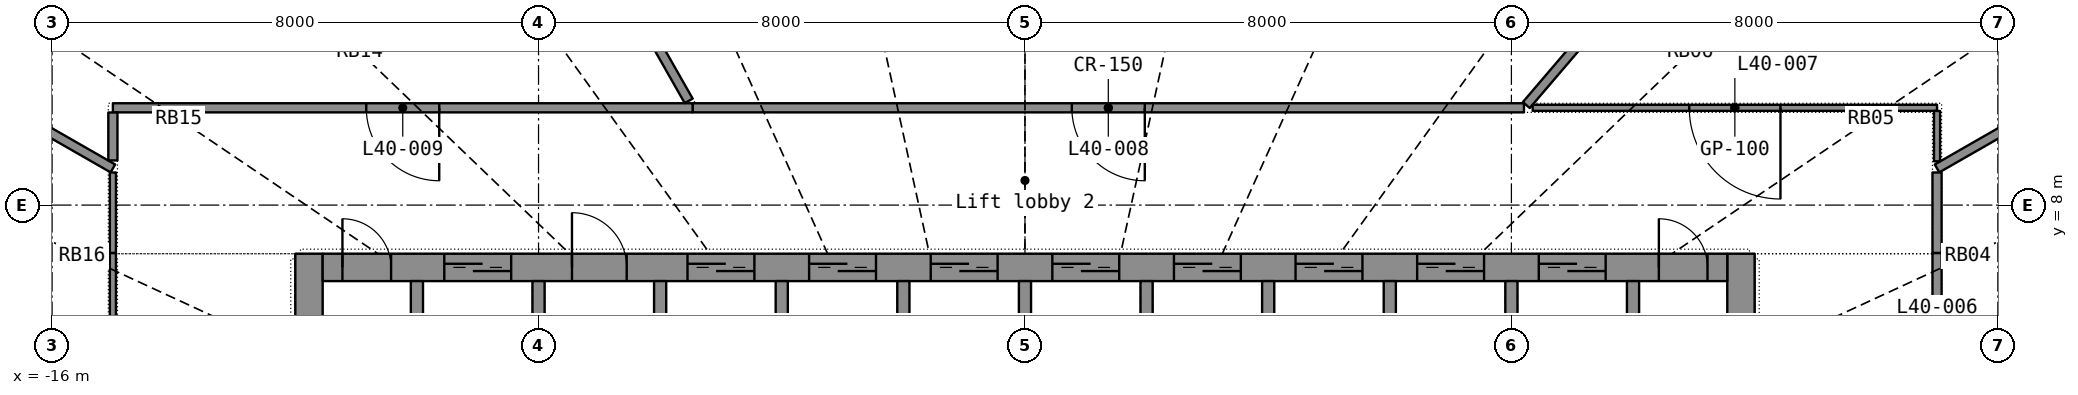
"""IFC4 building model, lengths in metres.
Left out: names, types, materials, properties, quantities, classifications, styles, units other than length and angle.
Written with IfcOpenShell. Run it as: python <this file> out.ifc"""

import sys

from ifc_helpers import new_model, si_unit, direction, frame, frame_2d, origin, place, context, subcontext, project, spatial, rectangle, extrude, element, fill, save


model = new_model("IFC4")
c1 = context("Model", 3, precision=1e-05, world=origin(), true_north=direction((0.0, 1.0)))
c2 = subcontext(c1, "Body", "Model", "MODEL_VIEW")
j1 = project(units=[si_unit("LENGTHUNIT", "METRE"), si_unit("PLANEANGLEUNIT", "RADIAN")], contexts=[c1])
p1 = place(None, origin())
s1 = spatial("IfcSite", under=j1, at=p1, CompositionType="ELEMENT")
p2 = place(p1, origin())
s2 = spatial("IfcBuilding", under=s1, at=p2, CompositionType="ELEMENT")
p3 = place(p2, frame((0.0, 0.0, 168.2)))
s3 = spatial("IfcBuildingStorey", under=s2, at=p3, CompositionType="ELEMENT", Elevation=168.2)
p4 = place(p3, frame((-11.775, -7.2, 0.0), z_axis=(0.0, 0.0, 1.0), x_axis=(0.0, 1.0, 0.0)))
e1 = element("IfcWall", 1, at=p4, inside=s3, PredefinedType="SHEAR", context=c2, shape_type="SweptSolid", body=[
    extrude(rectangle(XDim=14.4, YDim=0.45, at=frame_2d((7.2, 0.0))), origin(), (0.0, 0.0, 1.0), 3.3),
])
p5 = place(p4, frame((6.5, 0.0, 0.0)))
e2 = element("IfcOpeningElement", 2, at=p5, cuts=e1, PredefinedType="OPENING", context=c2, shape_type="SweptSolid", body=[
    extrude(rectangle(XDim=1.4, YDim=2.2, at=frame_2d((0.7, 1.1))), frame((0.0, 0.235, 0.0), z_axis=(0.0, -1.0, 0.0), x_axis=(1.0, 0.0, 0.0)), (0.0, 0.0, 1.0), 0.47),
])
p6 = place(p3, frame((11.775, -7.2, 0.0), z_axis=(0.0, 0.0, 1.0), x_axis=(0.0, 1.0, 0.0)))
e3 = element("IfcWall", 3, at=p6, inside=s3, PredefinedType="SHEAR", context=c2, shape_type="SweptSolid", body=[
    extrude(rectangle(XDim=14.4, YDim=0.45, at=frame_2d((7.2, 0.0))), origin(), (0.0, 0.0, 1.0), 3.3),
])
p7 = place(p6, frame((6.5, 0.0, 0.0)))
e4 = element("IfcOpeningElement", 4, at=p7, cuts=e3, PredefinedType="OPENING", context=c2, shape_type="SweptSolid", body=[
    extrude(rectangle(XDim=1.4, YDim=2.2, at=frame_2d((0.7, 1.1))), frame((0.0, 0.235, 0.0), z_axis=(0.0, -1.0, 0.0), x_axis=(1.0, 0.0, 0.0)), (0.0, 0.0, 1.0), 0.47),
])
p8 = place(p3, frame((-11.55, 6.975, 0.0), z_axis=(0.0, 0.0, 1.0), x_axis=(1.0, 0.0, 0.0)))
e5 = element("IfcWall", 5, at=p8, inside=s3, PredefinedType="SHEAR", context=c2, shape_type="SweptSolid", body=[
    extrude(rectangle(XDim=23.1, YDim=0.45, at=frame_2d((11.55, 0.0))), origin(), (0.0, 0.0, 1.0), 3.3),
])
p9 = place(p8, frame((2.0, 0.0, 0.0)))
e6 = element("IfcOpeningElement", 6, at=p9, cuts=e5, PredefinedType="OPENING", context=c2, shape_type="SweptSolid", body=[
    extrude(rectangle(XDim=1.1, YDim=2.2, at=frame_2d((0.55, 1.1))), frame((0.0, 0.235, 0.0), z_axis=(0.0, -1.0, 0.0), x_axis=(1.0, 0.0, 0.0)), (0.0, 0.0, 1.0), 0.47),
])
p10 = place(p8, frame((6.0, 0.0, 0.0)))
e7 = element("IfcOpeningElement", 7, at=p10, cuts=e5, PredefinedType="OPENING", context=c2, shape_type="SweptSolid", body=[
    extrude(rectangle(XDim=1.1, YDim=2.2, at=frame_2d((0.55, 1.1))), frame((0.0, 0.235, 0.0), z_axis=(0.0, -1.0, 0.0), x_axis=(1.0, 0.0, 0.0)), (0.0, 0.0, 1.0), 0.47),
])
p11 = place(p8, frame((8.0, 0.0, 0.0)))
e8 = element("IfcOpeningElement", 8, at=p11, cuts=e5, PredefinedType="OPENING", context=c2, shape_type="SweptSolid", body=[
    extrude(rectangle(XDim=1.1, YDim=2.2, at=frame_2d((0.55, 1.1))), frame((0.0, 0.235, 0.0), z_axis=(0.0, -1.0, 0.0), x_axis=(1.0, 0.0, 0.0)), (0.0, 0.0, 1.0), 0.47),
])
p12 = place(p8, frame((10.0, 0.0, 0.0)))
e9 = element("IfcOpeningElement", 9, at=p12, cuts=e5, PredefinedType="OPENING", context=c2, shape_type="SweptSolid", body=[
    extrude(rectangle(XDim=1.1, YDim=2.2, at=frame_2d((0.55, 1.1))), frame((0.0, 0.235, 0.0), z_axis=(0.0, -1.0, 0.0), x_axis=(1.0, 0.0, 0.0)), (0.0, 0.0, 1.0), 0.47),
])
p13 = place(p8, frame((12.0, 0.0, 0.0)))
e10 = element("IfcOpeningElement", 10, at=p13, cuts=e5, PredefinedType="OPENING", context=c2, shape_type="SweptSolid", body=[
    extrude(rectangle(XDim=1.1, YDim=2.2, at=frame_2d((0.55, 1.1))), frame((0.0, 0.235, 0.0), z_axis=(0.0, -1.0, 0.0), x_axis=(1.0, 0.0, 0.0)), (0.0, 0.0, 1.0), 0.47),
])
p14 = place(p8, frame((14.0, 0.0, 0.0)))
e11 = element("IfcOpeningElement", 11, at=p14, cuts=e5, PredefinedType="OPENING", context=c2, shape_type="SweptSolid", body=[
    extrude(rectangle(XDim=1.1, YDim=2.2, at=frame_2d((0.55, 1.1))), frame((0.0, 0.235, 0.0), z_axis=(0.0, -1.0, 0.0), x_axis=(1.0, 0.0, 0.0)), (0.0, 0.0, 1.0), 0.47),
])
p15 = place(p8, frame((16.0, 0.0, 0.0)))
e12 = element("IfcOpeningElement", 12, at=p15, cuts=e5, PredefinedType="OPENING", context=c2, shape_type="SweptSolid", body=[
    extrude(rectangle(XDim=1.1, YDim=2.2, at=frame_2d((0.55, 1.1))), frame((0.0, 0.235, 0.0), z_axis=(0.0, -1.0, 0.0), x_axis=(1.0, 0.0, 0.0)), (0.0, 0.0, 1.0), 0.47),
])
p16 = place(p8, frame((18.0, 0.0, 0.0)))
e13 = element("IfcOpeningElement", 13, at=p16, cuts=e5, PredefinedType="OPENING", context=c2, shape_type="SweptSolid", body=[
    extrude(rectangle(XDim=1.1, YDim=2.2, at=frame_2d((0.55, 1.1))), frame((0.0, 0.235, 0.0), z_axis=(0.0, -1.0, 0.0), x_axis=(1.0, 0.0, 0.0)), (0.0, 0.0, 1.0), 0.47),
])
p17 = place(p8, frame((20.0, 0.0, 0.0)))
e14 = element("IfcOpeningElement", 14, at=p17, cuts=e5, PredefinedType="OPENING", context=c2, shape_type="SweptSolid", body=[
    extrude(rectangle(XDim=1.1, YDim=2.2, at=frame_2d((0.55, 1.1))), frame((0.0, 0.235, 0.0), z_axis=(0.0, -1.0, 0.0), x_axis=(1.0, 0.0, 0.0)), (0.0, 0.0, 1.0), 0.47),
])
p18 = place(p8, frame((4.1, 0.0, 0.0)))
e15 = element("IfcOpeningElement", 15, at=p18, cuts=e5, PredefinedType="OPENING", context=c2, shape_type="SweptSolid", body=[
    extrude(rectangle(XDim=0.9, YDim=2.1, at=frame_2d((0.45, 1.05))), frame((0.0, 0.235, 0.0), z_axis=(0.0, -1.0, 0.0), x_axis=(1.0, 0.0, 0.0)), (0.0, 0.0, 1.0), 0.47),
])
p19 = place(p8, frame((0.325, 0.0, 0.0)))
e16 = element("IfcOpeningElement", 16, at=p19, cuts=e5, PredefinedType="OPENING", context=c2, shape_type="SweptSolid", body=[
    extrude(rectangle(XDim=0.8, YDim=2.05, at=frame_2d((0.4, 1.025))), frame((0.0, 0.235, 0.0), z_axis=(0.0, -1.0, 0.0), x_axis=(1.0, 0.0, 0.0)), (0.0, 0.0, 1.0), 0.47),
])
p20 = place(p8, frame((21.975, 0.0, 0.0)))
e17 = element("IfcOpeningElement", 17, at=p20, cuts=e5, PredefinedType="OPENING", context=c2, shape_type="SweptSolid", body=[
    extrude(rectangle(XDim=0.8, YDim=2.05, at=frame_2d((0.4, 1.025))), frame((0.0, 0.235, 0.0), z_axis=(0.0, -1.0, 0.0), x_axis=(1.0, 0.0, 0.0)), (0.0, 0.0, 1.0), 0.47),
])
for number, where, z_axis, x_axis in (
    (18, (-10.0, 3.9, 0.0), (0.0, 0.0, 1.0), (0.0, 1.0, 0.0)),
    (19, (-8.0, 3.9, 0.0), (0.0, 0.0, 1.0), (0.0, 1.0, 0.0)),
    (20, (-6.0, 3.9, 0.0), (0.0, 0.0, 1.0), (0.0, 1.0, 0.0)),
    (21, (-4.0, 3.9, 0.0), (0.0, 0.0, 1.0), (0.0, 1.0, 0.0)),
    (22, (-2.0, 3.9, 0.0), (0.0, 0.0, 1.0), (0.0, 1.0, 0.0)),
    (23, (0.0, 3.9, 0.0), (0.0, 0.0, 1.0), (0.0, 1.0, 0.0)),
    (24, (2.0, 3.9, 0.0), (0.0, 0.0, 1.0), (0.0, 1.0, 0.0)),
    (25, (4.0, 3.9, 0.0), (0.0, 0.0, 1.0), (0.0, 1.0, 0.0)),
    (26, (6.0, 3.9, 0.0), (0.0, 0.0, 1.0), (0.0, 1.0, 0.0)),
    (27, (8.0, 3.9, 0.0), (0.0, 0.0, 1.0), (0.0, 1.0, 0.0)),
    (28, (10.0, 3.9, 0.0), (0.0, 0.0, 1.0), (0.0, 1.0, 0.0)),
):
    element("IfcWall", number, at=place(p3, frame(where, z_axis=z_axis, x_axis=x_axis)), inside=s3, PredefinedType="SHEAR", context=c2, shape_type="SweptSolid", body=[
        extrude(rectangle(XDim=2.85, YDim=0.2, at=frame_2d((1.425, 0.0))), origin(), (0.0, 0.0, 1.0), 3.3),
    ])
p21 = place(p3, frame((8.206, 9.6, 0.0), z_axis=(0.0, 0.0, 1.0), x_axis=(-1.0, 0.0, 0.0)))
e29 = element("IfcWall", 29, at=p21, inside=s3, PredefinedType="PARTITIONING", context=c2, shape_type="SweptSolid", body=[
    extrude(rectangle(XDim=13.671, YDim=0.15, at=frame_2d((6.836, 0.0))), origin(), (0.0, 0.0, 1.0), 2.4),
])
p22 = place(p21, frame((6.236, 0.0, 0.0)))
e30 = element("IfcOpeningElement", 30, at=p22, cuts=e29, PredefinedType="OPENING", context=c2, shape_type="SweptSolid", body=[
    extrude(rectangle(XDim=1.2, YDim=2.2, at=frame_2d((0.6, 1.1))), frame((0.0, 0.085, 0.0), z_axis=(0.0, -1.0, 0.0), x_axis=(1.0, 0.0, 0.0)), (0.0, 0.0, 1.0), 0.17),
])
p23 = place(p3, frame((-5.466, 9.6, 0.0), z_axis=(0.0, 0.0, 1.0), x_axis=(-1.0, 0.0, 0.0)))
e31 = element("IfcWall", 31, at=p23, inside=s3, PredefinedType="PARTITIONING", context=c2, shape_type="SweptSolid", body=[
    extrude(rectangle(XDim=9.534, YDim=0.15, at=frame_2d((4.767, 0.0))), origin(), (0.0, 0.0, 1.0), 2.4),
])
p24 = place(p23, frame((4.167, 0.0, 0.0)))
e32 = element("IfcOpeningElement", 32, at=p24, cuts=e31, PredefinedType="OPENING", context=c2, shape_type="SweptSolid", body=[
    extrude(rectangle(XDim=1.2, YDim=2.2, at=frame_2d((0.6, 1.1))), frame((0.0, 0.085, 0.0), z_axis=(0.0, -1.0, 0.0), x_axis=(1.0, 0.0, 0.0)), (0.0, 0.0, 1.0), 0.17),
])
p25 = place(p3, frame((-9.884, 17.362, 0.0), z_axis=(0.0, 0.0, 1.0), x_axis=(0.494734165, -0.869044364, 0.0)))
e33 = element("IfcWall", 33, at=p25, inside=s3, PredefinedType="PARTITIONING", context=c2, shape_type="SweptSolid", body=[
    extrude(rectangle(XDim=8.801, YDim=0.15, at=frame_2d((4.4, 0.0))), origin(), (0.0, 0.0, 1.0), 2.4),
])
p26 = place(p3, frame((13.416, 15.694, 0.0), z_axis=(0.0, 0.0, 1.0), x_axis=(-0.649787725, -0.760115723, 0.0)))
e34 = element("IfcWall", 34, at=p26, inside=s3, PredefinedType="PARTITIONING", context=c2, shape_type="SweptSolid", body=[
    extrude(rectangle(XDim=7.958, YDim=0.15, at=frame_2d((3.979, 0.0))), origin(), (0.0, 0.0, 1.0), 2.4),
])
p27 = place(p3, frame((15.0, 9.6, 0.0), z_axis=(0.0, 0.0, 1.0), x_axis=(-1.0, 0.0, 0.0)))
e35 = element("IfcWall", 35, at=p27, inside=s3, PredefinedType="PARTITIONING", context=c2, shape_type="SweptSolid", body=[
    extrude(rectangle(XDim=6.65, YDim=0.1, at=frame_2d((3.325, 0.0))), origin(), (0.0, 0.0, 1.0), 2.4),
])
p28 = place(p27, frame((2.575, 0.0, 0.0)))
e36 = element("IfcOpeningElement", 36, at=p28, cuts=e35, PredefinedType="OPENING", context=c2, shape_type="SweptSolid", body=[
    extrude(rectangle(XDim=1.5, YDim=2.4, at=frame_2d((0.75, 1.2))), frame((0.0, 0.06, 0.0), z_axis=(0.0, -1.0, 0.0), x_axis=(1.0, 0.0, 0.0)), (0.0, 0.0, 1.0), 0.12),
])
p29 = place(p3, frame((-19.169, 10.994, 0.0), z_axis=(0.0, 0.0, 1.0), x_axis=(0.867457349, -0.497511556, 0.0)))
e37 = element("IfcWall", 37, at=p29, inside=s3, PredefinedType="PARTITIONING", context=c2, shape_type="SweptSolid", body=[
    extrude(rectangle(XDim=4.806, YDim=0.15, at=frame_2d((2.403, 0.0))), origin(), (0.0, 0.0, 1.0), 2.4),
])
p30 = place(p3, frame((19.167, 10.993, 0.0), z_axis=(0.0, 0.0, 1.0), x_axis=(-0.867466381, -0.497495807, 0.0)))
e38 = element("IfcWall", 38, at=p30, inside=s3, PredefinedType="PARTITIONING", context=c2, shape_type="SweptSolid", body=[
    extrude(rectangle(XDim=4.803, YDim=0.15, at=frame_2d((2.402, 0.0))), origin(), (0.0, 0.0, 1.0), 2.4),
])
p31 = place(p3, frame((-15.0, 7.212, 0.0), z_axis=(0.0, 0.0, 1.0), x_axis=(0.0, -1.0, 0.0)))
e39 = element("IfcWall", 39, at=p31, inside=s3, PredefinedType="PARTITIONING", context=c2, shape_type="SweptSolid", body=[
    extrude(rectangle(XDim=3.83, YDim=0.1, at=frame_2d((1.915, 0.0))), origin(), (0.0, 0.0, 1.0), 2.4),
])
p32 = place(p31, frame((1.165, 0.0, 0.0)))
e40 = element("IfcOpeningElement", 40, at=p32, cuts=e39, PredefinedType="OPENING", context=c2, shape_type="SweptSolid", body=[
    extrude(rectangle(XDim=1.5, YDim=2.4, at=frame_2d((0.75, 1.2))), frame((0.0, 0.06, 0.0), z_axis=(0.0, -1.0, 0.0), x_axis=(1.0, 0.0, 0.0)), (0.0, 0.0, 1.0), 0.12),
])
p33 = place(p3, frame((15.0, 3.387, 0.0), z_axis=(0.0, 0.0, 1.0), x_axis=(0.0, 1.0, 0.0)))
e41 = element("IfcWall", 41, at=p33, inside=s3, PredefinedType="PARTITIONING", context=c2, shape_type="SweptSolid", body=[
    extrude(rectangle(XDim=3.824, YDim=0.15, at=frame_2d((1.912, 0.0))), origin(), (0.0, 0.0, 1.0), 2.4),
])
p34 = place(p33, frame((1.437, 0.0, 0.0)))
e42 = element("IfcOpeningElement", 42, at=p34, cuts=e41, PredefinedType="OPENING", context=c2, shape_type="SweptSolid", body=[
    extrude(rectangle(XDim=0.95, YDim=2.15, at=frame_2d((0.475, 1.075))), frame((0.0, 0.085, 0.0), z_axis=(0.0, -1.0, 0.0), x_axis=(1.0, 0.0, 0.0)), (0.0, 0.0, 1.0), 0.17),
])
p35 = place(p3, frame((-15.0, 8.536, 0.0), z_axis=(0.0, 0.0, 1.0), x_axis=(0.0, -1.0, 0.0)))
e43 = element("IfcWall", 43, at=p35, inside=s3, PredefinedType="PARTITIONING", context=c2, shape_type="SweptSolid", body=[
    extrude(rectangle(XDim=1.323, YDim=0.1, at=frame_2d((0.662, 0.0))), origin(), (0.0, 0.0, 1.0), 2.4),
])
p36 = place(p3, frame((15.0, 7.213, 0.0), z_axis=(0.0, 0.0, 1.0), x_axis=(0.0, 1.0, 0.0)))
e44 = element("IfcWall", 44, at=p36, inside=s3, PredefinedType="PARTITIONING", context=c2, shape_type="SweptSolid", body=[
    extrude(rectangle(XDim=1.323, YDim=0.15, at=frame_2d((0.662, 0.0))), origin(), (0.0, 0.0, 1.0), 2.4),
])
p37 = place(p3, frame((-15.0, 9.523, 0.0), z_axis=(0.0, 0.0, 1.0), x_axis=(0.0, -1.0, 0.0)))
e45 = element("IfcWall", 45, at=p37, inside=s3, PredefinedType="PARTITIONING", context=c2, shape_type="SweptSolid", body=[
    extrude(rectangle(XDim=0.788, YDim=0.15, at=frame_2d((0.394, 0.0))), origin(), (0.0, 0.0, 1.0), 2.4),
])
p38 = place(p3, frame((15.0, 8.72, 0.0), z_axis=(0.0, 0.0, 1.0), x_axis=(0.0, 1.0, 0.0)))
e46 = element("IfcWall", 46, at=p38, inside=s3, PredefinedType="PARTITIONING", context=c2, shape_type="SweptSolid", body=[
    extrude(rectangle(XDim=0.828, YDim=0.1, at=frame_2d((0.414, 0.0))), origin(), (0.0, 0.0, 1.0), 2.4),
])
p39 = place(p9, origin())
e47 = element("IfcDoor", 47, at=p39, inside=s3, OperationType="DOUBLE_DOOR_SLIDING", PredefinedType="DOOR", context=c2, shape_type="SweptSolid", body=[
    extrude(rectangle(XDim=1.1, YDim=2.2, at=frame_2d((0.55, 1.1))), frame((0.0, 0.025, 0.0), z_axis=(0.0, -1.0, 0.0), x_axis=(1.0, 0.0, 0.0)), (0.0, 0.0, 1.0), 0.05),
])
fill(e6, e47)
p40 = place(p10, origin())
e48 = element("IfcDoor", 48, at=p40, inside=s3, OperationType="DOUBLE_DOOR_SLIDING", PredefinedType="DOOR", context=c2, shape_type="SweptSolid", body=[
    extrude(rectangle(XDim=1.1, YDim=2.2, at=frame_2d((0.55, 1.1))), frame((0.0, 0.025, 0.0), z_axis=(0.0, -1.0, 0.0), x_axis=(1.0, 0.0, 0.0)), (0.0, 0.0, 1.0), 0.05),
])
fill(e7, e48)
p41 = place(p11, origin())
e49 = element("IfcDoor", 49, at=p41, inside=s3, OperationType="DOUBLE_DOOR_SLIDING", PredefinedType="DOOR", context=c2, shape_type="SweptSolid", body=[
    extrude(rectangle(XDim=1.1, YDim=2.2, at=frame_2d((0.55, 1.1))), frame((0.0, 0.025, 0.0), z_axis=(0.0, -1.0, 0.0), x_axis=(1.0, 0.0, 0.0)), (0.0, 0.0, 1.0), 0.05),
])
fill(e8, e49)
p42 = place(p12, origin())
e50 = element("IfcDoor", 50, at=p42, inside=s3, OperationType="DOUBLE_DOOR_SLIDING", PredefinedType="DOOR", context=c2, shape_type="SweptSolid", body=[
    extrude(rectangle(XDim=1.1, YDim=2.2, at=frame_2d((0.55, 1.1))), frame((0.0, 0.025, 0.0), z_axis=(0.0, -1.0, 0.0), x_axis=(1.0, 0.0, 0.0)), (0.0, 0.0, 1.0), 0.05),
])
fill(e9, e50)
p43 = place(p13, origin())
e51 = element("IfcDoor", 51, at=p43, inside=s3, OperationType="DOUBLE_DOOR_SLIDING", PredefinedType="DOOR", context=c2, shape_type="SweptSolid", body=[
    extrude(rectangle(XDim=1.1, YDim=2.2, at=frame_2d((0.55, 1.1))), frame((0.0, 0.025, 0.0), z_axis=(0.0, -1.0, 0.0), x_axis=(1.0, 0.0, 0.0)), (0.0, 0.0, 1.0), 0.05),
])
fill(e10, e51)
p44 = place(p14, origin())
e52 = element("IfcDoor", 52, at=p44, inside=s3, OperationType="DOUBLE_DOOR_SLIDING", PredefinedType="DOOR", context=c2, shape_type="SweptSolid", body=[
    extrude(rectangle(XDim=1.1, YDim=2.2, at=frame_2d((0.55, 1.1))), frame((0.0, 0.025, 0.0), z_axis=(0.0, -1.0, 0.0), x_axis=(1.0, 0.0, 0.0)), (0.0, 0.0, 1.0), 0.05),
])
fill(e11, e52)
p45 = place(p15, origin())
e53 = element("IfcDoor", 53, at=p45, inside=s3, OperationType="DOUBLE_DOOR_SLIDING", PredefinedType="DOOR", context=c2, shape_type="SweptSolid", body=[
    extrude(rectangle(XDim=1.1, YDim=2.2, at=frame_2d((0.55, 1.1))), frame((0.0, 0.025, 0.0), z_axis=(0.0, -1.0, 0.0), x_axis=(1.0, 0.0, 0.0)), (0.0, 0.0, 1.0), 0.05),
])
fill(e12, e53)
p46 = place(p16, origin())
e54 = element("IfcDoor", 54, at=p46, inside=s3, OperationType="DOUBLE_DOOR_SLIDING", PredefinedType="DOOR", context=c2, shape_type="SweptSolid", body=[
    extrude(rectangle(XDim=1.1, YDim=2.2, at=frame_2d((0.55, 1.1))), frame((0.0, 0.025, 0.0), z_axis=(0.0, -1.0, 0.0), x_axis=(1.0, 0.0, 0.0)), (0.0, 0.0, 1.0), 0.05),
])
fill(e13, e54)
p47 = place(p17, origin())
e55 = element("IfcDoor", 55, at=p47, inside=s3, OperationType="DOUBLE_DOOR_SLIDING", PredefinedType="DOOR", context=c2, shape_type="SweptSolid", body=[
    extrude(rectangle(XDim=1.1, YDim=2.2, at=frame_2d((0.55, 1.1))), frame((0.0, 0.025, 0.0), z_axis=(0.0, -1.0, 0.0), x_axis=(1.0, 0.0, 0.0)), (0.0, 0.0, 1.0), 0.05),
])
fill(e14, e55)
p48 = place(p18, origin())
e56 = element("IfcDoor", 56, at=p48, inside=s3, OperationType="SINGLE_SWING_LEFT", PredefinedType="DOOR", context=c2, shape_type="SweptSolid", body=[
    extrude(rectangle(XDim=0.9, YDim=2.1, at=frame_2d((0.45, 1.05))), frame((0.0, 0.025, 0.0), z_axis=(0.0, -1.0, 0.0), x_axis=(1.0, 0.0, 0.0)), (0.0, 0.0, 1.0), 0.05),
])
fill(e15, e56)
p49 = place(p19, origin())
e57 = element("IfcDoor", 57, at=p49, inside=s3, OperationType="SINGLE_SWING_LEFT", PredefinedType="DOOR", context=c2, shape_type="SweptSolid", body=[
    extrude(rectangle(XDim=0.8, YDim=2.05, at=frame_2d((0.4, 1.025))), frame((0.0, 0.025, 0.0), z_axis=(0.0, -1.0, 0.0), x_axis=(1.0, 0.0, 0.0)), (0.0, 0.0, 1.0), 0.05),
])
fill(e16, e57)
p50 = place(p20, origin())
e58 = element("IfcDoor", 58, at=p50, inside=s3, OperationType="SINGLE_SWING_LEFT", PredefinedType="DOOR", context=c2, shape_type="SweptSolid", body=[
    extrude(rectangle(XDim=0.8, YDim=2.05, at=frame_2d((0.4, 1.025))), frame((0.0, 0.025, 0.0), z_axis=(0.0, -1.0, 0.0), x_axis=(1.0, 0.0, 0.0)), (0.0, 0.0, 1.0), 0.05),
])
fill(e17, e58)
p51 = place(p28, origin())
e59 = element("IfcDoor", 59, at=p51, inside=s3, OperationType="DOUBLE_DOOR_SINGLE_SWING", PredefinedType="DOOR", context=c2, shape_type="SweptSolid", body=[
    extrude(rectangle(XDim=1.5, YDim=2.4, at=frame_2d((0.75, 1.2))), frame((0.0, 0.025, 0.0), z_axis=(0.0, -1.0, 0.0), x_axis=(1.0, 0.0, 0.0)), (0.0, 0.0, 1.0), 0.05),
])
fill(e36, e59)
p52 = place(p22, origin())
e60 = element("IfcDoor", 60, at=p52, inside=s3, OperationType="DOUBLE_DOOR_SINGLE_SWING", PredefinedType="DOOR", context=c2, shape_type="SweptSolid", body=[
    extrude(rectangle(XDim=1.2, YDim=2.2, at=frame_2d((0.6, 1.1))), frame((0.0, 0.025, 0.0), z_axis=(0.0, -1.0, 0.0), x_axis=(1.0, 0.0, 0.0)), (0.0, 0.0, 1.0), 0.05),
])
fill(e30, e60)
p53 = place(p24, origin())
e61 = element("IfcDoor", 61, at=p53, inside=s3, OperationType="DOUBLE_DOOR_SINGLE_SWING", PredefinedType="DOOR", context=c2, shape_type="SweptSolid", body=[
    extrude(rectangle(XDim=1.2, YDim=2.2, at=frame_2d((0.6, 1.1))), frame((0.0, 0.025, 0.0), z_axis=(0.0, -1.0, 0.0), x_axis=(1.0, 0.0, 0.0)), (0.0, 0.0, 1.0), 0.05),
])
fill(e32, e61)
save(model, sys.argv[1])
